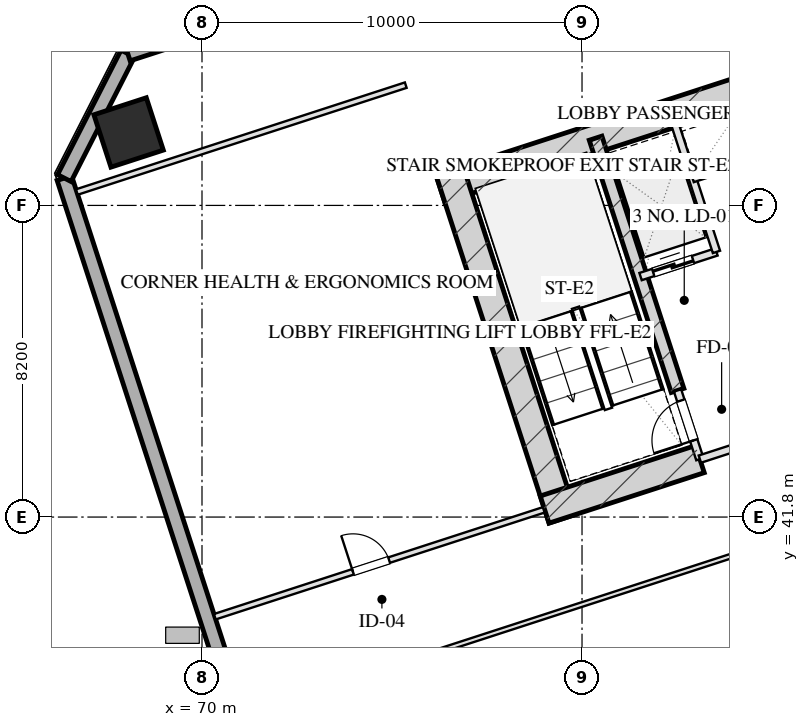
"""IFC4 building model, lengths in metres.
Left out: names, types, materials, properties, quantities, classifications, styles, units other than length and angle.
Written with IfcOpenShell. Run it as: python <this file> out.ifc"""

import sys

from ifc_helpers import new_model, si_unit, direction, frame, frame_2d, origin, origin_2d, place, context, subcontext, project, spatial, rectangle, hollow_rectangle, extrude, element, fill, save


model = new_model("IFC4")
c1 = context("Model", 3, precision=1e-05, world=origin(), true_north=direction((0.0, 1.0)))
c2 = subcontext(c1, "Body", "Model", "MODEL_VIEW")
j1 = project(units=[si_unit("LENGTHUNIT", "METRE"), si_unit("PLANEANGLEUNIT", "RADIAN")], contexts=[c1])
p1 = place(None, origin())
s1 = spatial("IfcSite", under=j1, at=p1, CompositionType="ELEMENT")
p2 = place(p1, origin())
s2 = spatial("IfcBuilding", under=s1, at=p2, CompositionType="ELEMENT")
p3 = place(p2, frame((0.0, 0.0, 88.55)))
s3 = spatial("IfcBuildingStorey", under=s2, at=p3, CompositionType="ELEMENT", Elevation=88.55)
p4 = place(p3, frame((76.272, 50.443, 0.0), z_axis=(0.0, 0.0, 1.0), x_axis=(0.951056072937, 0.309018358888, 0.0)))
e1 = element("IfcWall", 1, at=p4, inside=s3, PredefinedType="SHEAR", context=c2, shape_type="SweptSolid", body=[
    extrude(rectangle(XDim=16.55, YDim=0.75, at=frame_2d((8.275, 0.0))), origin(), (0.0, 0.0, 1.0), 3.45),
])
p5 = place(p3, frame((79.489, 41.756, 0.0), z_axis=(0.0, 0.0, 1.0), x_axis=(-0.309016134813, 0.951056795583, 0.0)))
e2 = element("IfcWall", 2, at=p5, inside=s3, PredefinedType="SHEAR", context=c2, shape_type="SweptSolid", body=[
    extrude(rectangle(XDim=9.63, YDim=0.75, at=frame_2d((4.815, 0.0))), origin(), (0.0, 0.0, 1.0), 3.45),
])
p6 = place(p3, frame((82.514, 45.131, 0.0), z_axis=(0.0, 0.0, 1.0), x_axis=(-0.308988790936, 0.951065679686, 0.0)))
e3 = element("IfcWall", 3, at=p6, inside=s3, PredefinedType="SHEAR", context=c2, shape_type="SweptSolid", body=[
    extrude(rectangle(XDim=6.98, YDim=0.35, at=frame_2d((3.49, 0.0))), origin(), (0.0, 0.0, 1.0), 3.45),
])
p7 = place(p3, frame((79.016, 41.997, 0.0), z_axis=(0.0, 0.0, 1.0), x_axis=(0.95106038264, 0.309005094736, 0.0)))
e4 = element("IfcWall", 4, at=p7, inside=s3, PredefinedType="SHEAR", context=c2, shape_type="SweptSolid", body=[
    extrude(rectangle(XDim=4.295, YDim=0.75, at=frame_2d((2.147, 0.0))), origin(), (0.0, 0.0, 1.0), 3.45),
])
p8 = place(p3, frame((68.069, 51.92, 0.0), z_axis=(0.0, 0.0, 1.0), x_axis=(0.951056516295, 0.309016994375, 0.0)))
e5 = element("IfcColumn", 5, at=p8, inside=s3, PredefinedType="COLUMN", context=c2, shape_type="SweptSolid", body=[
    extrude(hollow_rectangle(XDim=1.45, YDim=1.45, WallThickness=0.05, at=origin_2d()), origin(), (0.0, 0.0, 1.0), 3.451),
])
p9 = place(p3, frame((80.716, 6.59, 0.0), z_axis=(0.0, 0.0, 1.0), x_axis=(-0.309017542002, 0.95105633836, 0.0)))
e6 = element("IfcWall", 6, at=p9, inside=s3, PredefinedType="SOLIDWALL", context=c2, shape_type="SweptSolid", body=[
    extrude(rectangle(XDim=46.4, YDim=0.4, at=frame_2d((23.2, 0.0))), origin(), (0.0, 0.0, 1.0), 2.55),
])
p10 = place(p9, frame((28.4, 0.0, 0.75)))
e7 = element("IfcOpeningElement", 7, at=p10, cuts=e6, PredefinedType="OPENING", context=c2, shape_type="SweptSolid", body=[
    extrude(rectangle(XDim=2.4, YDim=1.4, at=frame_2d((1.2, 0.7))), frame((0.0, 0.21, 0.0), z_axis=(0.0, -1.0, 0.0), x_axis=(1.0, 0.0, 0.0)), (0.0, 0.0, 1.0), 0.42),
])
p11 = place(p9, frame((19.55, 0.0, 0.0)))
e8 = element("IfcOpeningElement", 8, at=p11, cuts=e6, PredefinedType="OPENING", context=c2, shape_type="SweptSolid", body=[
    extrude(rectangle(XDim=1.1, YDim=2.15, at=frame_2d((0.55, 1.075))), frame((0.0, 0.21, 0.0), z_axis=(0.0, -1.0, 0.0), x_axis=(1.0, 0.0, 0.0)), (0.0, 0.0, 1.0), 0.42),
])
p12 = place(p3, frame((66.377, 50.719, 0.0), z_axis=(0.0, 0.0, 1.0), x_axis=(0.454026238093, 0.890988313685, 0.0)))
e9 = element("IfcWall", 9, at=p12, inside=s3, PredefinedType="SOLIDWALL", context=c2, shape_type="SweptSolid", body=[
    extrude(rectangle(XDim=3.677, YDim=0.4, at=frame_2d((1.838, 0.0))), origin(), (0.0, 0.0, 1.0), 2.55),
])
p13 = place(p3, frame((68.047, 53.995, 0.0), z_axis=(0.0, 0.0, 1.0), x_axis=(0.95105505922, 0.309021478754, 0.0)))
e10 = element("IfcWall", 10, at=p13, inside=s3, PredefinedType="SOLIDWALL", context=c2, shape_type="SweptSolid", body=[
    extrude(rectangle(XDim=29.4, YDim=0.4, at=frame_2d((14.7, 0.0))), origin(), (0.0, 0.0, 1.0), 2.55),
])
p14 = place(p3, frame((83.101, 43.324, 0.0), z_axis=(0.0, 0.0, 1.0), x_axis=(-0.309048298632, 0.951046344356, 0.0)))
e11 = element("IfcWall", 11, at=p14, inside=s3, PredefinedType="PARTITIONING", context=c2, shape_type="SweptSolid", body=[
    extrude(rectangle(XDim=1.9, YDim=0.2, at=frame_2d((0.95, 0.0))), origin(), (0.0, 0.0, 1.0), 3.155),
])
p15 = place(p14, frame((0.52, 0.0, 0.0)))
e12 = element("IfcOpeningElement", 12, at=p15, cuts=e11, PredefinedType="OPENING", context=c2, shape_type="SweptSolid", body=[
    extrude(rectangle(XDim=1.1, YDim=2.05, at=frame_2d((0.55, 1.025))), frame((0.0, 0.11, 0.0), z_axis=(0.0, -1.0, 0.0), x_axis=(1.0, 0.0, 0.0)), (0.0, 0.0, 1.0), 0.22),
])
p16 = place(p3, frame((83.101, 43.324, 0.0), z_axis=(0.0, 0.0, 1.0), x_axis=(0.951052804469, 0.309028417967, 0.0)))
e13 = element("IfcWall", 13, at=p16, inside=s3, PredefinedType="PARTITIONING", context=c2, shape_type="SweptSolid", body=[
    extrude(rectangle(XDim=3.83, YDim=0.2, at=frame_2d((1.915, 0.0))), origin(), (0.0, 0.0, 1.0), 3.155),
])
p17 = place(p16, frame((1.35, 0.0, 0.0)))
e14 = element("IfcOpeningElement", 14, at=p17, cuts=e13, PredefinedType="OPENING", context=c2, shape_type="SweptSolid", body=[
    extrude(rectangle(XDim=1.2, YDim=2.05, at=frame_2d((0.6, 1.025))), frame((0.0, 0.11, 0.0), z_axis=(0.0, -1.0, 0.0), x_axis=(1.0, 0.0, 0.0)), (0.0, 0.0, 1.0), 0.22),
])
p18 = place(p3, frame((81.54, 48.127, 0.0), z_axis=(0.0, 0.0, 1.0), x_axis=(0.951062257173, 0.308999325213, 0.0)))
e15 = element("IfcWall", 15, at=p18, inside=s3, PredefinedType="PARTITIONING", context=c2, shape_type="SweptSolid", body=[
    extrude(rectangle(XDim=2.1, YDim=0.2, at=frame_2d((1.05, 0.0))), origin(), (0.0, 0.0, 1.0), 3.155),
])
p19 = place(p18, frame((0.35, 0.0, 0.0)))
e16 = element("IfcOpeningElement", 16, at=p19, cuts=e15, PredefinedType="OPENING", context=c2, shape_type="SweptSolid", body=[
    extrude(rectangle(XDim=1.1, YDim=2.05, at=frame_2d((0.55, 1.025))), frame((0.0, 0.11, 0.0), z_axis=(0.0, -1.0, 0.0), x_axis=(1.0, 0.0, 0.0)), (0.0, 0.0, 1.0), 0.22),
])
p20 = place(p3, frame((83.538, 48.776, 0.0), z_axis=(0.0, 0.0, 1.0), x_axis=(-0.3089935693, 0.951064127245, 0.0)))
e17 = element("IfcWall", 17, at=p20, inside=s3, PredefinedType="PARTITIONING", context=c2, shape_type="SweptSolid", body=[
    extrude(rectangle(XDim=3.7, YDim=0.2, at=frame_2d((1.85, 0.0))), origin(), (0.0, 0.0, 1.0), 3.155),
])
p21 = place(p3, frame((82.91, 50.707, 0.0), z_axis=(0.0, 0.0, 1.0), x_axis=(0.951041328149, 0.309063734775, 0.0)))
e18 = element("IfcWall", 18, at=p21, inside=s3, PredefinedType="PARTITIONING", context=c2, shape_type="SweptSolid", body=[
    extrude(rectangle(XDim=1.73, YDim=0.2, at=frame_2d((0.865, 0.0))), origin(), (0.0, 0.0, 1.0), 3.155),
])
p22 = place(p3, frame((66.707, 50.352, 0.0), z_axis=(0.0, 0.0, 1.0), x_axis=(0.951057133767, 0.309015093986, 0.0)))
e19 = element("IfcWall", 19, at=p22, inside=s3, PredefinedType="PARTITIONING", context=c2, shape_type="SweptSolid", body=[
    extrude(rectangle(XDim=9.1, YDim=0.15, at=frame_2d((4.55, 0.0))), origin(), (0.0, 0.0, 1.0), 3.155),
])
p23 = place(p3, frame((70.338, 39.177, 0.0), z_axis=(0.0, 0.0, 1.0), x_axis=(0.951059695568, 0.309007209409, 0.0)))
e20 = element("IfcWall", 20, at=p23, inside=s3, PredefinedType="PARTITIONING", context=c2, shape_type="SweptSolid", body=[
    extrude(rectangle(XDim=9.1, YDim=0.15, at=frame_2d((4.55, 0.0))), origin(), (0.0, 0.0, 1.0), 3.155),
])
p24 = place(p23, frame((3.822, 0.0, 0.0)))
e21 = element("IfcOpeningElement", 21, at=p24, cuts=e20, PredefinedType="OPENING", context=c2, shape_type="SweptSolid", body=[
    extrude(rectangle(XDim=1.0, YDim=2.05, at=frame_2d((0.5, 1.025))), frame((0.0, 0.085, 0.0), z_axis=(0.0, -1.0, 0.0), x_axis=(1.0, 0.0, 0.0)), (0.0, 0.0, 1.0), 0.17),
])
p25 = place(p3, frame((71.166, 36.629, 0.0), z_axis=(0.0, 0.0, 1.0), x_axis=(0.951057625014, 0.309013582067, 0.0)))
e22 = element("IfcWall", 22, at=p25, inside=s3, PredefinedType="PARTITIONING", context=c2, shape_type="SweptSolid", body=[
    extrude(rectangle(XDim=18.125, YDim=0.12, at=frame_2d((9.062, 0.0))), origin(), (0.0, 0.0, 1.0), 3.155),
])
p26 = place(p3, frame((72.336, 33.028, 0.0), z_axis=(0.0, 0.0, 1.0), x_axis=(0.951058911225, 0.309009623443, 0.0)))
e23 = element("IfcWall", 23, at=p26, inside=s3, PredefinedType="PARTITIONING", context=c2, shape_type="SweptSolid", body=[
    extrude(rectangle(XDim=18.125, YDim=0.12, at=frame_2d((9.062, 0.0))), origin(), (0.0, 0.0, 1.0), 3.155),
])
p27 = place(p15, origin())
e24 = element("IfcDoor", 24, at=p27, inside=s3, OperationType="SINGLE_SWING_LEFT", PredefinedType="DOOR", context=c2, shape_type="SweptSolid", body=[
    extrude(rectangle(XDim=1.1, YDim=2.05, at=frame_2d((0.55, 1.025))), frame((0.0, 0.025, 0.0), z_axis=(0.0, -1.0, 0.0), x_axis=(1.0, 0.0, 0.0)), (0.0, 0.0, 1.0), 0.05),
])
fill(e12, e24)
p28 = place(p19, origin())
e25 = element("IfcDoor", 25, at=p28, inside=s3, OperationType="DOUBLE_DOOR_SLIDING", PredefinedType="DOOR", context=c2, shape_type="SweptSolid", body=[
    extrude(rectangle(XDim=1.1, YDim=2.05, at=frame_2d((0.55, 1.025))), frame((0.0, 0.025, 0.0), z_axis=(0.0, -1.0, 0.0), x_axis=(1.0, 0.0, 0.0)), (0.0, 0.0, 1.0), 0.05),
])
fill(e16, e25)
p29 = place(p24, origin())
e26 = element("IfcDoor", 26, at=p29, inside=s3, OperationType="SINGLE_SWING_LEFT", PredefinedType="DOOR", context=c2, shape_type="SweptSolid", body=[
    extrude(rectangle(XDim=1.0, YDim=2.05, at=frame_2d((0.5, 1.025))), frame((0.0, 0.025, 0.0), z_axis=(0.0, -1.0, 0.0), x_axis=(1.0, 0.0, 0.0)), (0.0, 0.0, 1.0), 0.05),
])
fill(e21, e26)
save(model, sys.argv[1])
